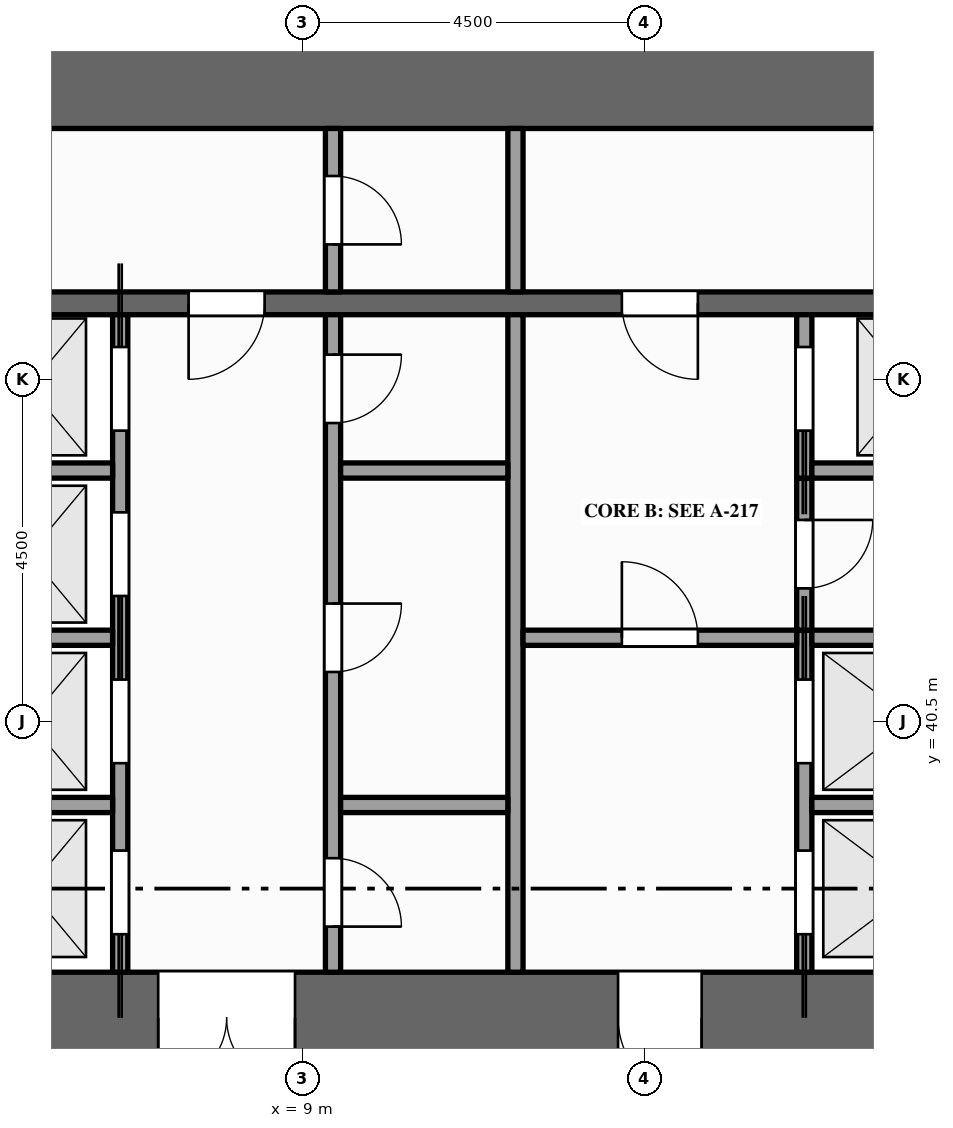
"""IFC4 building model, lengths in metres.
Left out: names, types, materials, properties, quantities, classifications, styles, units other than length and angle.
Written with IfcOpenShell. Run it as: python <this file> out.ifc"""

import sys

from ifc_helpers import new_model, si_unit, direction, frame, frame_2d, origin, place, context, subcontext, project, spatial, rectangle, extrude, element, fill, save


model = new_model("IFC4")
c1 = context("Model", 3, precision=1e-05, world=origin(), true_north=direction((0.0, 1.0)))
c2 = subcontext(c1, "Body", "Model", "MODEL_VIEW")
j1 = project(units=[si_unit("LENGTHUNIT", "METRE"), si_unit("PLANEANGLEUNIT", "RADIAN")], contexts=[c1])
p1 = place(None, origin())
s1 = spatial("IfcSite", under=j1, at=p1, CompositionType="ELEMENT")
p2 = place(p1, origin())
s2 = spatial("IfcBuilding", under=s1, at=p2, CompositionType="ELEMENT")
p3 = place(p2, frame((0.0, 0.0, 95.0)))
s3 = spatial("IfcBuildingStorey", under=s2, at=p3, CompositionType="ELEMENT", Elevation=95.0)
p4 = place(p3, frame((0.0, 36.6, -0.15), z_axis=(0.0, 0.0, 1.0), x_axis=(1.0, 0.0, 0.0)))
e1 = element("IfcWall", 1, at=p4, inside=s3, PredefinedType="SHEAR", context=c2, shape_type="SweptSolid", body=[
    extrude(rectangle(XDim=22.5, YDim=1.2, at=frame_2d((11.25, 0.0))), origin(), (0.0, 0.0, 1.0), 4.0),
])
p5 = place(p4, frame((7.1, 0.0, 0.15)))
e2 = element("IfcOpeningElement", 2, at=p5, cuts=e1, PredefinedType="OPENING", context=c2, shape_type="SweptSolid", body=[
    extrude(rectangle(XDim=1.8, YDim=2.1, at=frame_2d((0.9, 1.05))), frame((0.0, 0.61, 0.0), z_axis=(0.0, -1.0, 0.0), x_axis=(1.0, 0.0, 0.0)), (0.0, 0.0, 1.0), 1.22),
])
p6 = place(p4, frame((13.15, 0.0, 0.15)))
e3 = element("IfcOpeningElement", 3, at=p6, cuts=e1, PredefinedType="OPENING", context=c2, shape_type="SweptSolid", body=[
    extrude(rectangle(XDim=1.1, YDim=2.1, at=frame_2d((0.55, 1.05))), frame((0.0, 0.61, 0.0), z_axis=(0.0, -1.0, 0.0), x_axis=(1.0, 0.0, 0.0)), (0.0, 0.0, 1.0), 1.22),
])
p7 = place(p4, frame((2.15, 0.0, 0.15)))
e4 = element("IfcOpeningElement", 4, at=p7, cuts=e1, PredefinedType="OPENING", context=c2, shape_type="SweptSolid", body=[
    extrude(rectangle(XDim=1.1, YDim=2.1, at=frame_2d((0.55, 1.05))), frame((0.0, 0.61, 0.0), z_axis=(0.0, -1.0, 0.0), x_axis=(1.0, 0.0, 0.0)), (0.0, 0.0, 1.0), 1.22),
])
p8 = place(p4, frame((19.35, 0.0, 0.15)))
e5 = element("IfcOpeningElement", 5, at=p8, cuts=e1, PredefinedType="OPENING", context=c2, shape_type="SweptSolid", body=[
    extrude(rectangle(XDim=1.1, YDim=2.1, at=frame_2d((0.55, 1.05))), frame((0.0, 0.61, 0.0), z_axis=(0.0, -1.0, 0.0), x_axis=(1.0, 0.0, 0.0)), (0.0, 0.0, 1.0), 1.22),
])
p9 = place(p3, frame((0.0, 48.9, -0.15), z_axis=(0.0, 0.0, 1.0), x_axis=(1.0, 0.0, 0.0)))
e6 = element("IfcWall", 6, at=p9, inside=s3, PredefinedType="SHEAR", context=c2, shape_type="SweptSolid", body=[
    extrude(rectangle(XDim=22.5, YDim=1.2, at=frame_2d((11.25, 0.0))), origin(), (0.0, 0.0, 1.0), 4.0),
])
p10 = place(p3, frame((6.6, 37.2, 0.0), z_axis=(0.0, 0.0, 1.0), x_axis=(0.0, 1.0, 0.0)))
e7 = element("IfcWall", 7, at=p10, inside=s3, PredefinedType="SOLIDWALL", context=c2, shape_type="SweptSolid", body=[
    extrude(rectangle(XDim=8.65, YDim=0.2, at=frame_2d((4.325, 0.0))), origin(), (0.0, 0.0, 1.0), 3.85),
])
p11 = place(p10, frame((0.5, 0.0, 0.012)))
e8 = element("IfcOpeningElement", 8, at=p11, cuts=e7, PredefinedType="OPENING", context=c2, shape_type="SweptSolid", body=[
    extrude(rectangle(XDim=1.1, YDim=2.1, at=frame_2d((0.55, 1.05))), frame((0.0, 0.11, 0.0), z_axis=(0.0, -1.0, 0.0), x_axis=(1.0, 0.0, 0.0)), (0.0, 0.0, 1.0), 0.22),
])
p12 = place(p10, frame((2.75, 0.0, 0.012)))
e9 = element("IfcOpeningElement", 9, at=p12, cuts=e7, PredefinedType="OPENING", context=c2, shape_type="SweptSolid", body=[
    extrude(rectangle(XDim=1.1, YDim=2.1, at=frame_2d((0.55, 1.05))), frame((0.0, 0.11, 0.0), z_axis=(0.0, -1.0, 0.0), x_axis=(1.0, 0.0, 0.0)), (0.0, 0.0, 1.0), 0.22),
])
p13 = place(p10, frame((4.95, 0.0, 0.012)))
e10 = element("IfcOpeningElement", 10, at=p13, cuts=e7, PredefinedType="OPENING", context=c2, shape_type="SweptSolid", body=[
    extrude(rectangle(XDim=1.1, YDim=2.1, at=frame_2d((0.55, 1.05))), frame((0.0, 0.11, 0.0), z_axis=(0.0, -1.0, 0.0), x_axis=(1.0, 0.0, 0.0)), (0.0, 0.0, 1.0), 0.22),
])
p14 = place(p10, frame((7.125, 0.0, 0.012)))
e11 = element("IfcOpeningElement", 11, at=p14, cuts=e7, PredefinedType="OPENING", context=c2, shape_type="SweptSolid", body=[
    extrude(rectangle(XDim=1.1, YDim=2.1, at=frame_2d((0.55, 1.05))), frame((0.0, 0.11, 0.0), z_axis=(0.0, -1.0, 0.0), x_axis=(1.0, 0.0, 0.0)), (0.0, 0.0, 1.0), 0.22),
])
p15 = place(p3, frame((9.4, 37.2, 0.0), z_axis=(0.0, 0.0, 1.0), x_axis=(0.0, 1.0, 0.0)))
e12 = element("IfcWall", 12, at=p15, inside=s3, PredefinedType="PARTITIONING", context=c2, shape_type="SweptSolid", body=[
    extrude(rectangle(XDim=8.65, YDim=0.2, at=frame_2d((4.325, 0.0))), origin(), (0.0, 0.0, 1.0), 3.85),
])
p16 = place(p15, frame((0.6, 0.0, 0.0)))
e13 = element("IfcOpeningElement", 13, at=p16, cuts=e12, PredefinedType="OPENING", context=c2, shape_type="SweptSolid", body=[
    extrude(rectangle(XDim=0.9, YDim=2.1, at=frame_2d((0.45, 1.05))), frame((0.0, 0.11, 0.0), z_axis=(0.0, -1.0, 0.0), x_axis=(1.0, 0.0, 0.0)), (0.0, 0.0, 1.0), 0.22),
])
p17 = place(p15, frame((3.95, 0.0, 0.0)))
e14 = element("IfcOpeningElement", 14, at=p17, cuts=e12, PredefinedType="OPENING", context=c2, shape_type="SweptSolid", body=[
    extrude(rectangle(XDim=0.9, YDim=2.1, at=frame_2d((0.45, 1.05))), frame((0.0, 0.11, 0.0), z_axis=(0.0, -1.0, 0.0), x_axis=(1.0, 0.0, 0.0)), (0.0, 0.0, 1.0), 0.22),
])
p18 = place(p15, frame((7.225, 0.0, 0.0)))
e15 = element("IfcOpeningElement", 15, at=p18, cuts=e12, PredefinedType="OPENING", context=c2, shape_type="SweptSolid", body=[
    extrude(rectangle(XDim=0.9, YDim=2.1, at=frame_2d((0.45, 1.05))), frame((0.0, 0.11, 0.0), z_axis=(0.0, -1.0, 0.0), x_axis=(1.0, 0.0, 0.0)), (0.0, 0.0, 1.0), 0.22),
])
p19 = place(p3, frame((9.4, 46.15, 0.0), z_axis=(0.0, 0.0, 1.0), x_axis=(0.0, 1.0, 0.0)))
e16 = element("IfcWall", 16, at=p19, inside=s3, PredefinedType="PARTITIONING", context=c2, shape_type="SweptSolid", body=[
    extrude(rectangle(XDim=2.15, YDim=0.2, at=frame_2d((1.075, 0.0))), origin(), (0.0, 0.0, 1.0), 3.85),
])
p20 = place(p19, frame((0.625, 0.0, 0.0)))
e17 = element("IfcOpeningElement", 17, at=p20, cuts=e16, PredefinedType="OPENING", context=c2, shape_type="SweptSolid", body=[
    extrude(rectangle(XDim=0.9, YDim=2.1, at=frame_2d((0.45, 1.05))), frame((0.0, 0.11, 0.0), z_axis=(0.0, -1.0, 0.0), x_axis=(1.0, 0.0, 0.0)), (0.0, 0.0, 1.0), 0.22),
])
p21 = place(p3, frame((11.8, 37.2, 0.0), z_axis=(0.0, 0.0, 1.0), x_axis=(0.0, 1.0, 0.0)))
e18 = element("IfcWall", 18, at=p21, inside=s3, PredefinedType="PARTITIONING", context=c2, shape_type="SweptSolid", body=[
    extrude(rectangle(XDim=8.65, YDim=0.2, at=frame_2d((4.325, 0.0))), origin(), (0.0, 0.0, 1.0), 3.85),
])
p22 = place(p3, frame((11.8, 46.15, 0.0), z_axis=(0.0, 0.0, 1.0), x_axis=(0.0, 1.0, 0.0)))
e19 = element("IfcWall", 19, at=p22, inside=s3, PredefinedType="PARTITIONING", context=c2, shape_type="SweptSolid", body=[
    extrude(rectangle(XDim=2.15, YDim=0.2, at=frame_2d((1.075, 0.0))), origin(), (0.0, 0.0, 1.0), 3.85),
])
p23 = place(p3, frame((15.6, 37.2, 0.0), z_axis=(0.0, 0.0, 1.0), x_axis=(0.0, 1.0, 0.0)))
e20 = element("IfcWall", 20, at=p23, inside=s3, PredefinedType="SOLIDWALL", context=c2, shape_type="SweptSolid", body=[
    extrude(rectangle(XDim=4.5, YDim=0.2, at=frame_2d((2.25, 0.0))), origin(), (0.0, 0.0, 1.0), 3.85),
])
p24 = place(p23, frame((0.5, 0.0, 0.012)))
e21 = element("IfcOpeningElement", 21, at=p24, cuts=e20, PredefinedType="OPENING", context=c2, shape_type="SweptSolid", body=[
    extrude(rectangle(XDim=1.1, YDim=2.1, at=frame_2d((0.55, 1.05))), frame((0.0, 0.11, 0.0), z_axis=(0.0, -1.0, 0.0), x_axis=(1.0, 0.0, 0.0)), (0.0, 0.0, 1.0), 0.22),
])
p25 = place(p23, frame((2.75, 0.0, 0.012)))
e22 = element("IfcOpeningElement", 22, at=p25, cuts=e20, PredefinedType="OPENING", context=c2, shape_type="SweptSolid", body=[
    extrude(rectangle(XDim=1.1, YDim=2.1, at=frame_2d((0.55, 1.05))), frame((0.0, 0.11, 0.0), z_axis=(0.0, -1.0, 0.0), x_axis=(1.0, 0.0, 0.0)), (0.0, 0.0, 1.0), 0.22),
])
p26 = place(p3, frame((15.6, 41.7, 0.0), z_axis=(0.0, 0.0, 1.0), x_axis=(0.0, 1.0, 0.0)))
e23 = element("IfcWall", 23, at=p26, inside=s3, PredefinedType="PARTITIONING", context=c2, shape_type="SweptSolid", body=[
    extrude(rectangle(XDim=2.0, YDim=0.2, at=frame_2d((1.0, 0.0))), origin(), (0.0, 0.0, 1.0), 3.85),
])
p27 = place(p26, frame((0.55, 0.0, 0.0)))
e24 = element("IfcOpeningElement", 24, at=p27, cuts=e23, PredefinedType="OPENING", context=c2, shape_type="SweptSolid", body=[
    extrude(rectangle(XDim=0.9, YDim=2.1, at=frame_2d((0.45, 1.05))), frame((0.0, 0.11, 0.0), z_axis=(0.0, -1.0, 0.0), x_axis=(1.0, 0.0, 0.0)), (0.0, 0.0, 1.0), 0.22),
])
p28 = place(p3, frame((15.6, 43.7, 0.0), z_axis=(0.0, 0.0, 1.0), x_axis=(0.0, 1.0, 0.0)))
e25 = element("IfcWall", 25, at=p28, inside=s3, PredefinedType="SOLIDWALL", context=c2, shape_type="SweptSolid", body=[
    extrude(rectangle(XDim=2.15, YDim=0.2, at=frame_2d((1.075, 0.0))), origin(), (0.0, 0.0, 1.0), 3.85),
])
p29 = place(p28, frame((0.625, 0.0, 0.012)))
e26 = element("IfcOpeningElement", 26, at=p29, cuts=e25, PredefinedType="OPENING", context=c2, shape_type="SweptSolid", body=[
    extrude(rectangle(XDim=1.1, YDim=2.1, at=frame_2d((0.55, 1.05))), frame((0.0, 0.11, 0.0), z_axis=(0.0, -1.0, 0.0), x_axis=(1.0, 0.0, 0.0)), (0.0, 0.0, 1.0), 0.22),
])
p30 = place(p3, frame((4.325, 39.4, 0.0), z_axis=(0.0, 0.0, 1.0), x_axis=(1.0, 0.0, 0.0)))
e27 = element("IfcWall", 27, at=p30, inside=s3, PredefinedType="SOLIDWALL", context=c2, shape_type="SweptSolid", body=[
    extrude(rectangle(XDim=2.175, YDim=0.2, at=frame_2d((1.087, 0.0))), origin(), (0.0, 0.0, 1.0), 3.85),
])
p31 = place(p3, frame((9.5, 39.4, 0.0), z_axis=(0.0, 0.0, 1.0), x_axis=(1.0, 0.0, 0.0)))
e28 = element("IfcWall", 28, at=p31, inside=s3, PredefinedType="PARTITIONING", context=c2, shape_type="SweptSolid", body=[
    extrude(rectangle(XDim=2.2, YDim=0.2, at=frame_2d((1.1, 0.0))), origin(), (0.0, 0.0, 1.0), 3.85),
])
p32 = place(p3, frame((15.7, 39.4, 0.0), z_axis=(0.0, 0.0, 1.0), x_axis=(1.0, 0.0, 0.0)))
e29 = element("IfcWall", 29, at=p32, inside=s3, PredefinedType="SOLIDWALL", context=c2, shape_type="SweptSolid", body=[
    extrude(rectangle(XDim=2.675, YDim=0.2, at=frame_2d((1.337, 0.0))), origin(), (0.0, 0.0, 1.0), 3.85),
])
p33 = place(p3, frame((4.325, 41.6, 0.0), z_axis=(0.0, 0.0, 1.0), x_axis=(1.0, 0.0, 0.0)))
e30 = element("IfcWall", 30, at=p33, inside=s3, PredefinedType="SOLIDWALL", context=c2, shape_type="SweptSolid", body=[
    extrude(rectangle(XDim=2.175, YDim=0.2, at=frame_2d((1.087, 0.0))), origin(), (0.0, 0.0, 1.0), 3.85),
])
p34 = place(p3, frame((11.9, 41.6, 0.0), z_axis=(0.0, 0.0, 1.0), x_axis=(1.0, 0.0, 0.0)))
e31 = element("IfcWall", 31, at=p34, inside=s3, PredefinedType="PARTITIONING", context=c2, shape_type="SweptSolid", body=[
    extrude(rectangle(XDim=3.6, YDim=0.2, at=frame_2d((1.8, 0.0))), origin(), (0.0, 0.0, 1.0), 3.85),
])
p35 = place(p34, frame((1.3, 0.0, 0.0)))
e32 = element("IfcOpeningElement", 32, at=p35, cuts=e31, PredefinedType="OPENING", context=c2, shape_type="SweptSolid", body=[
    extrude(rectangle(XDim=1.0, YDim=2.1, at=frame_2d((0.5, 1.05))), frame((0.0, 0.11, 0.0), z_axis=(0.0, -1.0, 0.0), x_axis=(1.0, 0.0, 0.0)), (0.0, 0.0, 1.0), 0.22),
])
p36 = place(p3, frame((15.7, 41.6, 0.0), z_axis=(0.0, 0.0, 1.0), x_axis=(1.0, 0.0, 0.0)))
e33 = element("IfcWall", 33, at=p36, inside=s3, PredefinedType="SOLIDWALL", context=c2, shape_type="SweptSolid", body=[
    extrude(rectangle(XDim=2.675, YDim=0.2, at=frame_2d((1.337, 0.0))), origin(), (0.0, 0.0, 1.0), 3.85),
])
p37 = place(p3, frame((4.3, 43.8, 0.0), z_axis=(0.0, 0.0, 1.0), x_axis=(1.0, 0.0, 0.0)))
e34 = element("IfcWall", 34, at=p37, inside=s3, PredefinedType="SOLIDWALL", context=c2, shape_type="SweptSolid", body=[
    extrude(rectangle(XDim=2.2, YDim=0.2, at=frame_2d((1.1, 0.0))), origin(), (0.0, 0.0, 1.0), 3.85),
])
p38 = place(p3, frame((9.5, 43.8, 0.0), z_axis=(0.0, 0.0, 1.0), x_axis=(1.0, 0.0, 0.0)))
e35 = element("IfcWall", 35, at=p38, inside=s3, PredefinedType="PARTITIONING", context=c2, shape_type="SweptSolid", body=[
    extrude(rectangle(XDim=2.2, YDim=0.2, at=frame_2d((1.1, 0.0))), origin(), (0.0, 0.0, 1.0), 3.85),
])
p39 = place(p3, frame((15.7, 43.8, 0.0), z_axis=(0.0, 0.0, 1.0), x_axis=(1.0, 0.0, 0.0)))
e36 = element("IfcWall", 36, at=p39, inside=s3, PredefinedType="SOLIDWALL", context=c2, shape_type="SweptSolid", body=[
    extrude(rectangle(XDim=2.7, YDim=0.2, at=frame_2d((1.35, 0.0))), origin(), (0.0, 0.0, 1.0), 3.85),
])
p40 = place(p3, frame((4.1, 46.0, 0.0), z_axis=(0.0, 0.0, 1.0), x_axis=(1.0, 0.0, 0.0)))
e37 = element("IfcWall", 37, at=p40, inside=s3, PredefinedType="SHEAR", context=c2, shape_type="SweptSolid", body=[
    extrude(rectangle(XDim=14.5, YDim=0.3, at=frame_2d((7.25, 0.0))), origin(), (0.0, 0.0, 1.0), 3.85),
])
p41 = place(p40, frame((3.4, 0.0, 0.0)))
e38 = element("IfcOpeningElement", 38, at=p41, cuts=e37, PredefinedType="OPENING", context=c2, shape_type="SweptSolid", body=[
    extrude(rectangle(XDim=1.0, YDim=2.1, at=frame_2d((0.5, 1.05))), frame((0.0, 0.16, 0.0), z_axis=(0.0, -1.0, 0.0), x_axis=(1.0, 0.0, 0.0)), (0.0, 0.0, 1.0), 0.32),
])
p42 = place(p40, frame((9.1, 0.0, 0.0)))
e39 = element("IfcOpeningElement", 39, at=p42, cuts=e37, PredefinedType="OPENING", context=c2, shape_type="SweptSolid", body=[
    extrude(rectangle(XDim=1.0, YDim=2.1, at=frame_2d((0.5, 1.05))), frame((0.0, 0.16, 0.0), z_axis=(0.0, -1.0, 0.0), x_axis=(1.0, 0.0, 0.0)), (0.0, 0.0, 1.0), 0.32),
])
p43 = place(p11, origin())
e40 = element("IfcDoor", 40, at=p43, inside=s3, OperationType="SLIDING_TO_LEFT", PredefinedType="DOOR", context=c2, shape_type="SweptSolid", body=[
    extrude(rectangle(XDim=1.1, YDim=2.1, at=frame_2d((0.55, 1.05))), frame((0.0, 0.025, 0.0), z_axis=(0.0, -1.0, 0.0), x_axis=(1.0, 0.0, 0.0)), (0.0, 0.0, 1.0), 0.05),
])
fill(e8, e40)
p44 = place(p12, origin())
e41 = element("IfcDoor", 41, at=p44, inside=s3, OperationType="SLIDING_TO_RIGHT", PredefinedType="DOOR", context=c2, shape_type="SweptSolid", body=[
    extrude(rectangle(XDim=1.1, YDim=2.1, at=frame_2d((0.55, 1.05))), frame((0.0, 0.025, 0.0), z_axis=(0.0, -1.0, 0.0), x_axis=(1.0, 0.0, 0.0)), (0.0, 0.0, 1.0), 0.05),
])
fill(e9, e41)
p45 = place(p13, origin())
e42 = element("IfcDoor", 42, at=p45, inside=s3, OperationType="SLIDING_TO_LEFT", PredefinedType="DOOR", context=c2, shape_type="SweptSolid", body=[
    extrude(rectangle(XDim=1.1, YDim=2.1, at=frame_2d((0.55, 1.05))), frame((0.0, 0.025, 0.0), z_axis=(0.0, -1.0, 0.0), x_axis=(1.0, 0.0, 0.0)), (0.0, 0.0, 1.0), 0.05),
])
fill(e10, e42)
p46 = place(p14, origin())
e43 = element("IfcDoor", 43, at=p46, inside=s3, OperationType="SLIDING_TO_RIGHT", PredefinedType="DOOR", context=c2, shape_type="SweptSolid", body=[
    extrude(rectangle(XDim=1.1, YDim=2.1, at=frame_2d((0.55, 1.05))), frame((0.0, 0.025, 0.0), z_axis=(0.0, -1.0, 0.0), x_axis=(1.0, 0.0, 0.0)), (0.0, 0.0, 1.0), 0.05),
])
fill(e11, e43)
p47 = place(p24, origin())
e44 = element("IfcDoor", 44, at=p47, inside=s3, OperationType="SLIDING_TO_LEFT", PredefinedType="DOOR", context=c2, shape_type="SweptSolid", body=[
    extrude(rectangle(XDim=1.1, YDim=2.1, at=frame_2d((0.55, 1.05))), frame((0.0, 0.025, 0.0), z_axis=(0.0, -1.0, 0.0), x_axis=(1.0, 0.0, 0.0)), (0.0, 0.0, 1.0), 0.05),
])
fill(e21, e44)
p48 = place(p25, origin())
e45 = element("IfcDoor", 45, at=p48, inside=s3, OperationType="SLIDING_TO_RIGHT", PredefinedType="DOOR", context=c2, shape_type="SweptSolid", body=[
    extrude(rectangle(XDim=1.1, YDim=2.1, at=frame_2d((0.55, 1.05))), frame((0.0, 0.025, 0.0), z_axis=(0.0, -1.0, 0.0), x_axis=(1.0, 0.0, 0.0)), (0.0, 0.0, 1.0), 0.05),
])
fill(e22, e45)
p49 = place(p29, origin())
e46 = element("IfcDoor", 46, at=p49, inside=s3, OperationType="SLIDING_TO_LEFT", PredefinedType="DOOR", context=c2, shape_type="SweptSolid", body=[
    extrude(rectangle(XDim=1.1, YDim=2.1, at=frame_2d((0.55, 1.05))), frame((0.0, 0.025, 0.0), z_axis=(0.0, -1.0, 0.0), x_axis=(1.0, 0.0, 0.0)), (0.0, 0.0, 1.0), 0.05),
])
fill(e26, e46)
p50 = place(p5, origin())
e47 = element("IfcDoor", 47, at=p50, inside=s3, OperationType="DOUBLE_DOOR_SINGLE_SWING", PredefinedType="DOOR", context=c2, shape_type="SweptSolid", body=[
    extrude(rectangle(XDim=1.8, YDim=2.1, at=frame_2d((0.9, 1.05))), frame((0.0, 0.025, 0.0), z_axis=(0.0, -1.0, 0.0), x_axis=(1.0, 0.0, 0.0)), (0.0, 0.0, 1.0), 0.05),
])
fill(e2, e47)
p51 = place(p41, origin())
e48 = element("IfcDoor", 48, at=p51, inside=s3, OperationType="SINGLE_SWING_LEFT", PredefinedType="DOOR", context=c2, shape_type="SweptSolid", body=[
    extrude(rectangle(XDim=1.0, YDim=2.1, at=frame_2d((0.5, 1.05))), frame((0.0, 0.025, 0.0), z_axis=(0.0, -1.0, 0.0), x_axis=(1.0, 0.0, 0.0)), (0.0, 0.0, 1.0), 0.05),
])
fill(e38, e48)
p52 = place(p6, origin())
e49 = element("IfcDoor", 49, at=p52, inside=s3, OperationType="SINGLE_SWING_RIGHT", PredefinedType="DOOR", context=c2, shape_type="SweptSolid", body=[
    extrude(rectangle(XDim=1.1, YDim=2.1, at=frame_2d((0.55, 1.05))), frame((0.0, 0.025, 0.0), z_axis=(0.0, -1.0, 0.0), x_axis=(1.0, 0.0, 0.0)), (0.0, 0.0, 1.0), 0.05),
])
fill(e3, e49)
p53 = place(p35, origin())
e50 = element("IfcDoor", 50, at=p53, inside=s3, OperationType="SINGLE_SWING_LEFT", PredefinedType="DOOR", context=c2, shape_type="SweptSolid", body=[
    extrude(rectangle(XDim=1.0, YDim=2.1, at=frame_2d((0.5, 1.05))), frame((0.0, 0.025, 0.0), z_axis=(0.0, -1.0, 0.0), x_axis=(1.0, 0.0, 0.0)), (0.0, 0.0, 1.0), 0.05),
])
fill(e32, e50)
p54 = place(p42, origin())
e51 = element("IfcDoor", 51, at=p54, inside=s3, OperationType="SINGLE_SWING_RIGHT", PredefinedType="DOOR", context=c2, shape_type="SweptSolid", body=[
    extrude(rectangle(XDim=1.0, YDim=2.1, at=frame_2d((0.5, 1.05))), frame((0.0, 0.025, 0.0), z_axis=(0.0, -1.0, 0.0), x_axis=(1.0, 0.0, 0.0)), (0.0, 0.0, 1.0), 0.05),
])
fill(e39, e51)
p55 = place(p20, origin())
e52 = element("IfcDoor", 52, at=p55, inside=s3, OperationType="SINGLE_SWING_LEFT", PredefinedType="DOOR", context=c2, shape_type="SweptSolid", body=[
    extrude(rectangle(XDim=0.9, YDim=2.1, at=frame_2d((0.45, 1.05))), frame((0.0, 0.025, 0.0), z_axis=(0.0, -1.0, 0.0), x_axis=(1.0, 0.0, 0.0)), (0.0, 0.0, 1.0), 0.05),
])
fill(e17, e52)
p56 = place(p16, origin())
e53 = element("IfcDoor", 53, at=p56, inside=s3, OperationType="SINGLE_SWING_LEFT", PredefinedType="DOOR", context=c2, shape_type="SweptSolid", body=[
    extrude(rectangle(XDim=0.9, YDim=2.1, at=frame_2d((0.45, 1.05))), frame((0.0, 0.025, 0.0), z_axis=(0.0, -1.0, 0.0), x_axis=(1.0, 0.0, 0.0)), (0.0, 0.0, 1.0), 0.05),
])
fill(e13, e53)
p57 = place(p17, origin())
e54 = element("IfcDoor", 54, at=p57, inside=s3, OperationType="SINGLE_SWING_RIGHT", PredefinedType="DOOR", context=c2, shape_type="SweptSolid", body=[
    extrude(rectangle(XDim=0.9, YDim=2.1, at=frame_2d((0.45, 1.05))), frame((0.0, 0.025, 0.0), z_axis=(0.0, -1.0, 0.0), x_axis=(1.0, 0.0, 0.0)), (0.0, 0.0, 1.0), 0.05),
])
fill(e14, e54)
p58 = place(p18, origin())
e55 = element("IfcDoor", 55, at=p58, inside=s3, OperationType="SINGLE_SWING_RIGHT", PredefinedType="DOOR", context=c2, shape_type="SweptSolid", body=[
    extrude(rectangle(XDim=0.9, YDim=2.1, at=frame_2d((0.45, 1.05))), frame((0.0, 0.025, 0.0), z_axis=(0.0, -1.0, 0.0), x_axis=(1.0, 0.0, 0.0)), (0.0, 0.0, 1.0), 0.05),
])
fill(e15, e55)
p59 = place(p27, origin())
e56 = element("IfcDoor", 56, at=p59, inside=s3, OperationType="SINGLE_SWING_RIGHT", PredefinedType="DOOR", context=c2, shape_type="SweptSolid", body=[
    extrude(rectangle(XDim=0.9, YDim=2.1, at=frame_2d((0.45, 1.05))), frame((0.0, 0.025, 0.0), z_axis=(0.0, -1.0, 0.0), x_axis=(1.0, 0.0, 0.0)), (0.0, 0.0, 1.0), 0.05),
])
fill(e24, e56)
save(model, sys.argv[1])
